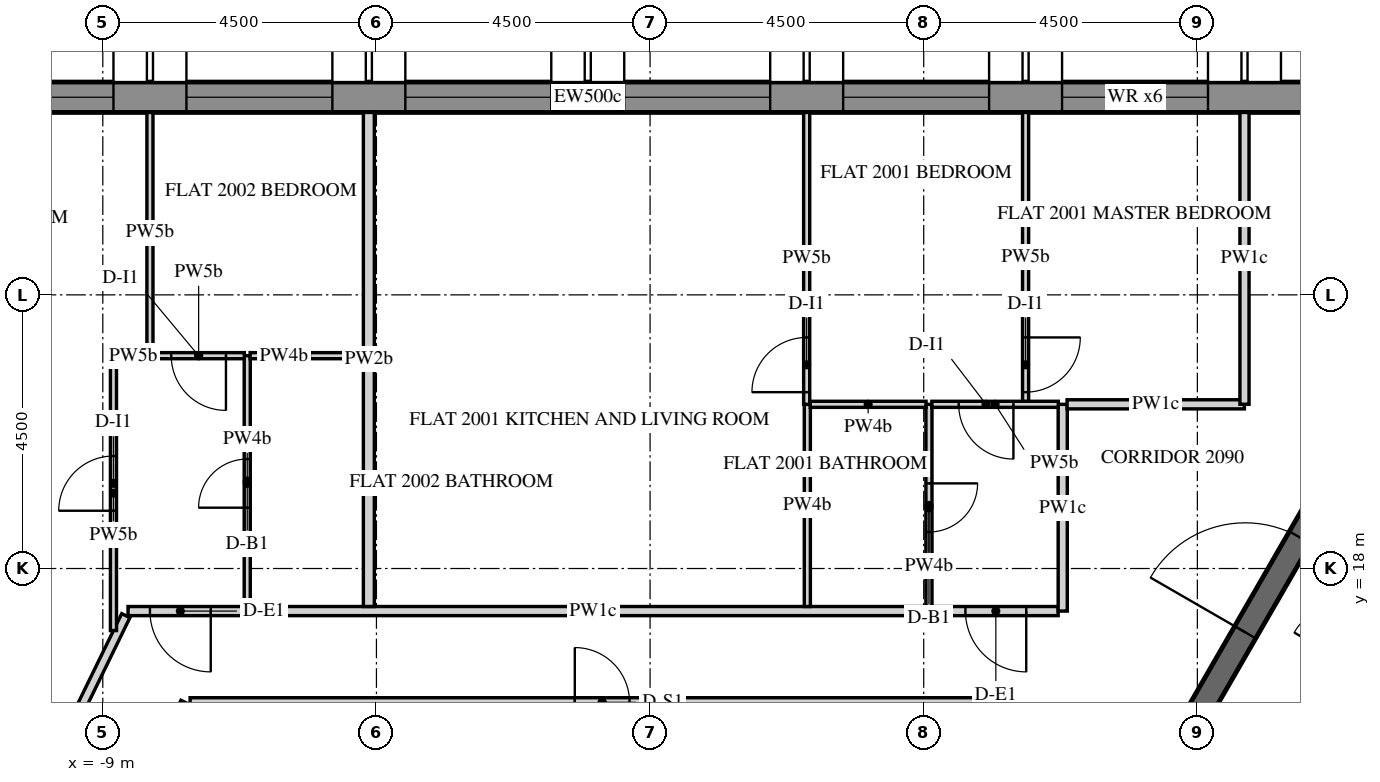
"""IFC4 building model, lengths in metres.
Left out: names, types, materials, properties, quantities, classifications, styles, units other than length and angle.
Written with IfcOpenShell. Run it as: python <this file> out.ifc"""

import sys

from ifc_helpers import new_model, si_unit, direction, frame, frame_2d, origin, place, context, subcontext, project, spatial, polyline, rectangle, outline, extrude, element, fill, save


model = new_model("IFC4")
c1 = context("Model", 3, precision=1e-05, world=origin(), true_north=direction((0.0, 1.0)))
c2 = subcontext(c1, "Body", "Model", "MODEL_VIEW")
j1 = project(units=[si_unit("LENGTHUNIT", "METRE"), si_unit("PLANEANGLEUNIT", "RADIAN")], contexts=[c1])
p1 = place(None, origin())
s1 = spatial("IfcSite", under=j1, at=p1, CompositionType="ELEMENT")
p2 = place(p1, origin())
s2 = spatial("IfcBuilding", under=s1, at=p2, CompositionType="ELEMENT")
p3 = place(p2, frame((0.0, 0.0, 256.2)))
s3 = spatial("IfcBuildingStorey", under=s2, at=p3, CompositionType="ELEMENT", Elevation=256.2)
p4 = place(p3, frame((11.698, 25.75, 0.0), z_axis=(0.0, 0.0, 1.0), x_axis=(-1.0, 0.0, 0.0)))
e1 = element("IfcWall", 1, at=p4, inside=s3, PredefinedType="SOLIDWALL", context=c2, shape_type="SweptSolid", body=[
    extrude(outline(polyline([(-0.021, -0.25), (25.468, -0.25), (25.421, 0.25), (0.021, 0.25), (-0.021, -0.25)])), origin(), (0.0, 0.0, 1.0), 3.75),
])
p5 = place(p4, frame((2.522, 0.0, 0.6)))
e2 = element("IfcOpeningElement", 2, at=p5, cuts=e1, PredefinedType="OPENING", context=c2, shape_type="SweptSolid", body=[
    extrude(rectangle(XDim=2.4, YDim=2.7, at=frame_2d((1.2, 1.35))), frame((0.0, 0.26, 0.0), z_axis=(0.0, -1.0, 0.0), x_axis=(1.0, 0.0, 0.0)), (0.0, 0.0, 1.0), 0.52),
])
p6 = place(p4, frame((6.122, 0.0, 0.6)))
e3 = element("IfcOpeningElement", 3, at=p6, cuts=e1, PredefinedType="OPENING", context=c2, shape_type="SweptSolid", body=[
    extrude(rectangle(XDim=2.4, YDim=2.7, at=frame_2d((1.2, 1.35))), frame((0.0, 0.26, 0.0), z_axis=(0.0, -1.0, 0.0), x_axis=(1.0, 0.0, 0.0)), (0.0, 0.0, 1.0), 0.52),
])
p7 = place(p4, frame((9.722, 0.0, 0.6)))
e4 = element("IfcOpeningElement", 4, at=p7, cuts=e1, PredefinedType="OPENING", context=c2, shape_type="SweptSolid", body=[
    extrude(rectangle(XDim=2.4, YDim=2.7, at=frame_2d((1.2, 1.35))), frame((0.0, 0.26, 0.0), z_axis=(0.0, -1.0, 0.0), x_axis=(1.0, 0.0, 0.0)), (0.0, 0.0, 1.0), 0.52),
])
p8 = place(p4, frame((13.323, 0.0, 0.6)))
e5 = element("IfcOpeningElement", 5, at=p8, cuts=e1, PredefinedType="OPENING", context=c2, shape_type="SweptSolid", body=[
    extrude(rectangle(XDim=2.4, YDim=2.7, at=frame_2d((1.2, 1.35))), frame((0.0, 0.26, 0.0), z_axis=(0.0, -1.0, 0.0), x_axis=(1.0, 0.0, 0.0)), (0.0, 0.0, 1.0), 0.52),
])
p9 = place(p4, frame((16.922, 0.0, 0.6)))
e6 = element("IfcOpeningElement", 6, at=p9, cuts=e1, PredefinedType="OPENING", context=c2, shape_type="SweptSolid", body=[
    extrude(rectangle(XDim=2.4, YDim=2.7, at=frame_2d((1.2, 1.35))), frame((0.0, 0.26, 0.0), z_axis=(0.0, -1.0, 0.0), x_axis=(1.0, 0.0, 0.0)), (0.0, 0.0, 1.0), 0.52),
])
p10 = place(p4, frame((20.522, 0.0, 0.6)))
e7 = element("IfcOpeningElement", 7, at=p10, cuts=e1, PredefinedType="OPENING", context=c2, shape_type="SweptSolid", body=[
    extrude(rectangle(XDim=2.4, YDim=2.7, at=frame_2d((1.2, 1.35))), frame((0.0, 0.26, 0.0), z_axis=(0.0, -1.0, 0.0), x_axis=(1.0, 0.0, 0.0)), (0.0, 0.0, 1.0), 0.52),
])
p11 = place(p3, frame((6.351, 11.0, 0.0), z_axis=(0.0, 0.0, 1.0), x_axis=(0.499998894578, 0.866026041999, 0.0)))
e8 = element("IfcWall", 8, at=p11, inside=s3, PredefinedType="SHEAR", context=c2, shape_type="SweptSolid", body=[
    extrude(rectangle(XDim=15.544, YDim=0.4, at=frame_2d((7.772, 0.0))), origin(), (0.0, 0.0, 1.0), 3.75),
])
p12 = place(p11, frame((6.872, 0.0, 0.0)))
e9 = element("IfcOpeningElement", 9, at=p12, cuts=e8, PredefinedType="OPENING", context=c2, shape_type="SweptSolid", body=[
    extrude(rectangle(XDim=1.8, YDim=2.4, at=frame_2d((0.9, 1.2))), frame((0.0, 0.21, 0.0), z_axis=(0.0, -1.0, 0.0), x_axis=(1.0, 0.0, 0.0)), (0.0, 0.0, 1.0), 0.42),
])
p13 = place(p3, frame((6.711, 17.3, 0.0), z_axis=(0.0, 0.0, 1.0), x_axis=(-1.0, 0.0, 0.0)))
e10 = element("IfcWall", 10, at=p13, inside=s3, PredefinedType="PARTITIONING", context=c2, shape_type="SweptSolid", body=[
    extrude(rectangle(XDim=15.296, YDim=0.15, at=frame_2d((7.648, 0.0))), origin(), (0.0, 0.0, 1.0), 2.823),
])
p14 = place(p13, frame((0.525, 0.0, 0.0)))
e11 = element("IfcOpeningElement", 11, at=p14, cuts=e10, PredefinedType="OPENING", context=c2, shape_type="SweptSolid", body=[
    extrude(rectangle(XDim=1.0, YDim=2.1, at=frame_2d((0.5, 1.05))), frame((0.0, 0.085, 0.0), z_axis=(0.0, -1.0, 0.0), x_axis=(1.0, 0.0, 0.0)), (0.0, 0.0, 1.0), 0.17),
])
p15 = place(p13, frame((13.936, 0.0, 0.0)))
e12 = element("IfcOpeningElement", 12, at=p15, cuts=e10, PredefinedType="OPENING", context=c2, shape_type="SweptSolid", body=[
    extrude(rectangle(XDim=1.0, YDim=2.1, at=frame_2d((0.5, 1.05))), frame((0.0, 0.085, 0.0), z_axis=(0.0, -1.0, 0.0), x_axis=(1.0, 0.0, 0.0)), (0.0, 0.0, 1.0), 0.17),
])
p16 = place(p3, frame((6.786, 20.7, 0.0), z_axis=(0.0, 0.0, 1.0), x_axis=(0.0, -1.0, 0.0)))
e13 = element("IfcWall", 13, at=p16, inside=s3, PredefinedType="PARTITIONING", context=c2, shape_type="SweptSolid", body=[
    extrude(rectangle(XDim=3.4, YDim=0.15, at=frame_2d((1.7, 0.0))), origin(), (0.0, 0.0, 1.0), 2.823),
])
p17 = place(p3, frame((9.774, 20.7, 0.0), z_axis=(0.0, 0.0, 1.0), x_axis=(-1.0, 0.0, 0.0)))
e14 = element("IfcWall", 14, at=p17, inside=s3, PredefinedType="PARTITIONING", context=c2, shape_type="SweptSolid", body=[
    extrude(rectangle(XDim=2.916, YDim=0.15, at=frame_2d((1.458, 0.0))), origin(), (0.0, 0.0, 1.0), 2.823),
])
p18 = place(p3, frame((9.775, 25.5, 0.0), z_axis=(0.0, 0.0, 1.0), x_axis=(0.0, -1.0, 0.0)))
e15 = element("IfcWall", 15, at=p18, inside=s3, PredefinedType="PARTITIONING", context=c2, shape_type="SweptSolid", body=[
    extrude(rectangle(XDim=4.799, YDim=0.15, at=frame_2d((2.399, 0.0))), origin(), (0.0, 0.0, 1.0), 2.823),
])
p19 = place(p3, frame((-8.622, 17.225, 0.0), z_axis=(0.0, 0.0, 1.0), x_axis=(-0.438366544921, -0.898796290765, 0.0)))
e16 = element("IfcWall", 16, at=p19, inside=s3, PredefinedType="PARTITIONING", context=c2, shape_type="SweptSolid", body=[
    extrude(rectangle(XDim=17.273, YDim=0.15, at=frame_2d((8.637, 0.0))), origin(), (0.0, 0.0, 1.0), 2.823),
])
p20 = place(p19, frame((6.478, 0.0, 0.0)))
e17 = element("IfcOpeningElement", 17, at=p20, cuts=e16, PredefinedType="OPENING", context=c2, shape_type="SweptSolid", body=[
    extrude(rectangle(XDim=1.0, YDim=2.1, at=frame_2d((0.5, 1.05))), frame((0.0, 0.085, 0.0), z_axis=(0.0, -1.0, 0.0), x_axis=(1.0, 0.0, 0.0)), (0.0, 0.0, 1.0), 0.17),
])
p21 = place(p3, frame((-11.499, 7.905, 0.0), z_axis=(0.0, 0.0, 1.0), x_axis=(0.438365041944, 0.898797023805, 0.0)))
e18 = element("IfcWall", 18, at=p21, inside=s3, PredefinedType="PARTITIONING", context=c2, shape_type="SweptSolid", body=[
    extrude(rectangle(XDim=8.784, YDim=0.15, at=frame_2d((4.392, 0.0))), origin(), (0.0, 0.0, 1.0), 2.823),
])
p22 = place(p3, frame((-7.564, 15.8, 0.0), z_axis=(0.0, 0.0, 1.0), x_axis=(1.0, 0.0, 0.0)))
e19 = element("IfcWall", 19, at=p22, inside=s3, PredefinedType="PARTITIONING", context=c2, shape_type="SweptSolid", body=[
    extrude(rectangle(XDim=13.553, YDim=0.15, at=frame_2d((6.776, 0.0))), origin(), (0.0, 0.0, 1.0), 2.823),
])
p23 = place(p22, frame((6.326, 0.0, 0.0)))
e20 = element("IfcOpeningElement", 20, at=p23, cuts=e19, PredefinedType="OPENING", context=c2, shape_type="SweptSolid", body=[
    extrude(rectangle(XDim=0.9, YDim=2.1, at=frame_2d((0.45, 1.05))), frame((0.0, 0.085, 0.0), z_axis=(0.0, -1.0, 0.0), x_axis=(1.0, 0.0, 0.0)), (0.0, 0.0, 1.0), 0.17),
])
p24 = place(p3, frame((9.611, 13.246, 0.0), z_axis=(0.0, 0.0, 1.0), x_axis=(0.499994435258, 0.866028616566, 0.0)))
e21 = element("IfcWall", 21, at=p24, inside=s3, PredefinedType="PARTITIONING", context=c2, shape_type="SweptSolid", body=[
    extrude(rectangle(XDim=7.097, YDim=0.15, at=frame_2d((3.548, 0.0))), origin(), (0.0, 0.0, 1.0), 2.823),
])
p25 = place(p24, frame((3.696, 0.0, 0.0)))
e22 = element("IfcOpeningElement", 22, at=p25, cuts=e21, PredefinedType="OPENING", context=c2, shape_type="SweptSolid", body=[
    extrude(rectangle(XDim=1.0, YDim=2.1, at=frame_2d((0.5, 1.05))), frame((0.0, 0.085, 0.0), z_axis=(0.0, -1.0, 0.0), x_axis=(1.0, 0.0, 0.0)), (0.0, 0.0, 1.0), 0.17),
])
p26 = place(p3, frame((2.586, 17.375, 0.0), z_axis=(0.0, 0.0, 1.0), x_axis=(0.0, 1.0, 0.0)))
e23 = element("IfcWall", 23, at=p26, inside=s3, PredefinedType="PARTITIONING", context=c2, shape_type="SweptSolid", body=[
    extrude(rectangle(XDim=3.325, YDim=0.1, at=frame_2d((1.663, 0.0))), origin(), (0.0, 0.0, 1.0), 2.823),
])
p27 = place(p3, frame((2.575, 20.7, 0.0), z_axis=(0.0, 0.0, 1.0), x_axis=(0.0, 1.0, 0.0)))
e24 = element("IfcWall", 24, at=p27, inside=s3, PredefinedType="PARTITIONING", context=c2, shape_type="SweptSolid", body=[
    extrude(rectangle(XDim=4.8, YDim=0.1, at=frame_2d((2.4, 0.0))), origin(), (0.0, 0.0, 1.0), 2.823),
])
p28 = place(p27, frame((0.2, 0.0, 0.0)))
e25 = element("IfcOpeningElement", 25, at=p28, cuts=e24, PredefinedType="OPENING", context=c2, shape_type="SweptSolid", body=[
    extrude(rectangle(XDim=0.9, YDim=2.1, at=frame_2d((0.45, 1.05))), frame((0.0, 0.06, 0.0), z_axis=(0.0, -1.0, 0.0), x_axis=(1.0, 0.0, 0.0)), (0.0, 0.0, 1.0), 0.12),
])
p29 = place(p3, frame((-4.625, 25.5, 0.0), z_axis=(0.0, 0.0, 1.0), x_axis=(0.0, -1.0, 0.0)))
e26 = element("IfcWall", 26, at=p29, inside=s3, PredefinedType="PARTITIONING", context=c2, shape_type="SweptSolid", body=[
    extrude(rectangle(XDim=8.125, YDim=0.18, at=frame_2d((4.062, 0.0))), origin(), (0.0, 0.0, 1.0), 2.823),
])
p30 = place(p3, frame((4.586, 20.7, 0.0), z_axis=(0.0, 0.0, 1.0), x_axis=(0.0, -1.0, 0.0)))
e27 = element("IfcWall", 27, at=p30, inside=s3, PredefinedType="PARTITIONING", context=c2, shape_type="SweptSolid", body=[
    extrude(rectangle(XDim=3.325, YDim=0.1, at=frame_2d((1.663, 0.0))), origin(), (0.0, 0.0, 1.0), 2.823),
])
p31 = place(p30, frame((1.3, 0.0, 0.0)))
e28 = element("IfcOpeningElement", 28, at=p31, cuts=e27, PredefinedType="OPENING", context=c2, shape_type="SweptSolid", body=[
    extrude(rectangle(XDim=0.8, YDim=2.1, at=frame_2d((0.4, 1.05))), frame((0.0, 0.06, 0.0), z_axis=(0.0, -1.0, 0.0), x_axis=(1.0, 0.0, 0.0)), (0.0, 0.0, 1.0), 0.12),
])
p32 = place(p3, frame((6.713, 20.7, 0.0), z_axis=(0.0, 0.0, 1.0), x_axis=(-1.0, 0.0, 0.0)))
e29 = element("IfcWall", 29, at=p32, inside=s3, PredefinedType="PARTITIONING", context=c2, shape_type="SweptSolid", body=[
    extrude(rectangle(XDim=2.079, YDim=0.1, at=frame_2d((1.04, 0.0))), origin(), (0.0, 0.0, 1.0), 2.823),
])
p33 = place(p32, frame((0.738, 0.0, 0.0)))
e30 = element("IfcOpeningElement", 30, at=p33, cuts=e29, PredefinedType="OPENING", context=c2, shape_type="SweptSolid", body=[
    extrude(rectangle(XDim=0.9, YDim=2.1, at=frame_2d((0.45, 1.05))), frame((0.0, 0.06, 0.0), z_axis=(0.0, -1.0, 0.0), x_axis=(1.0, 0.0, 0.0)), (0.0, 0.0, 1.0), 0.12),
])
p34 = place(p3, frame((4.538, 20.7, 0.0), z_axis=(0.0, 0.0, 1.0), x_axis=(-1.0, 0.0, 0.0)))
e31 = element("IfcWall", 31, at=p34, inside=s3, PredefinedType="PARTITIONING", context=c2, shape_type="SweptSolid", body=[
    extrude(rectangle(XDim=1.904, YDim=0.1, at=frame_2d((0.952, 0.0))), origin(), (0.0, 0.0, 1.0), 2.823),
])
p35 = place(p3, frame((6.175, 25.5, 0.0), z_axis=(0.0, 0.0, 1.0), x_axis=(0.0, -1.0, 0.0)))
e32 = element("IfcWall", 32, at=p35, inside=s3, PredefinedType="PARTITIONING", context=c2, shape_type="SweptSolid", body=[
    extrude(rectangle(XDim=4.75, YDim=0.1, at=frame_2d((2.375, 0.0))), origin(), (0.0, 0.0, 1.0), 2.823),
])
p36 = place(p35, frame((3.7, 0.0, 0.0)))
e33 = element("IfcOpeningElement", 33, at=p36, cuts=e32, PredefinedType="OPENING", context=c2, shape_type="SweptSolid", body=[
    extrude(rectangle(XDim=0.9, YDim=2.1, at=frame_2d((0.45, 1.05))), frame((0.0, 0.06, 0.0), z_axis=(0.0, -1.0, 0.0), x_axis=(1.0, 0.0, 0.0)), (0.0, 0.0, 1.0), 0.12),
])
p37 = place(p3, frame((-8.825, 16.979, 0.0), z_axis=(0.0, 0.0, 1.0), x_axis=(0.0, 1.0, 0.0)))
e34 = element("IfcWall", 34, at=p37, inside=s3, PredefinedType="PARTITIONING", context=c2, shape_type="SweptSolid", body=[
    extrude(rectangle(XDim=4.521, YDim=0.1, at=frame_2d((2.26, 0.0))), origin(), (0.0, 0.0, 1.0), 2.823),
])
p38 = place(p37, frame((1.97, 0.0, 0.0)))
e35 = element("IfcOpeningElement", 35, at=p38, cuts=e34, PredefinedType="OPENING", context=c2, shape_type="SweptSolid", body=[
    extrude(rectangle(XDim=0.9, YDim=2.1, at=frame_2d((0.45, 1.05))), frame((0.0, 0.06, 0.0), z_axis=(0.0, -1.0, 0.0), x_axis=(1.0, 0.0, 0.0)), (0.0, 0.0, 1.0), 0.12),
])
p39 = place(p3, frame((-8.775, 21.5, 0.0), z_axis=(0.0, 0.0, 1.0), x_axis=(1.0, 0.0, 0.0)))
e36 = element("IfcWall", 36, at=p39, inside=s3, PredefinedType="PARTITIONING", context=c2, shape_type="SweptSolid", body=[
    extrude(rectangle(XDim=0.552, YDim=0.1, at=frame_2d((0.276, 0.0))), origin(), (0.0, 0.0, 1.0), 2.823),
])
p40 = place(p3, frame((-8.225, 21.55, 0.0), z_axis=(0.0, 0.0, 1.0), x_axis=(0.0, 1.0, 0.0)))
e37 = element("IfcWall", 37, at=p40, inside=s3, PredefinedType="PARTITIONING", context=c2, shape_type="SweptSolid", body=[
    extrude(rectangle(XDim=3.95, YDim=0.1, at=frame_2d((1.975, 0.0))), origin(), (0.0, 0.0, 1.0), 2.823),
])
p41 = place(p3, frame((-6.625, 17.375, 0.0), z_axis=(0.0, 0.0, 1.0), x_axis=(0.0, 1.0, 0.0)))
e38 = element("IfcWall", 38, at=p41, inside=s3, PredefinedType="PARTITIONING", context=c2, shape_type="SweptSolid", body=[
    extrude(rectangle(XDim=4.125, YDim=0.1, at=frame_2d((2.062, 0.0))), origin(), (0.0, 0.0, 1.0), 2.823),
])
p42 = place(p41, frame((1.625, 0.0, 0.0)))
e39 = element("IfcOpeningElement", 39, at=p42, cuts=e38, PredefinedType="OPENING", context=c2, shape_type="SweptSolid", body=[
    extrude(rectangle(XDim=0.8, YDim=2.1, at=frame_2d((0.4, 1.05))), frame((0.0, 0.06, 0.0), z_axis=(0.0, -1.0, 0.0), x_axis=(1.0, 0.0, 0.0)), (0.0, 0.0, 1.0), 0.12),
])
p43 = place(p3, frame((-6.673, 21.5, 0.0), z_axis=(0.0, 0.0, 1.0), x_axis=(-1.0, 0.0, 0.0)))
e40 = element("IfcWall", 40, at=p43, inside=s3, PredefinedType="PARTITIONING", context=c2, shape_type="SweptSolid", body=[
    extrude(rectangle(XDim=1.502, YDim=0.1, at=frame_2d((0.751, 0.0))), origin(), (0.0, 0.0, 1.0), 2.823),
])
p44 = place(p43, frame((0.302, 0.0, 0.0)))
e41 = element("IfcOpeningElement", 41, at=p44, cuts=e40, PredefinedType="OPENING", context=c2, shape_type="SweptSolid", body=[
    extrude(rectangle(XDim=0.9, YDim=2.1, at=frame_2d((0.45, 1.05))), frame((0.0, 0.06, 0.0), z_axis=(0.0, -1.0, 0.0), x_axis=(1.0, 0.0, 0.0)), (0.0, 0.0, 1.0), 0.12),
])
p45 = place(p3, frame((-4.715, 21.5, 0.0), z_axis=(0.0, 0.0, 1.0), x_axis=(-1.0, 0.0, 0.0)))
e42 = element("IfcWall", 42, at=p45, inside=s3, PredefinedType="PARTITIONING", context=c2, shape_type="SweptSolid", body=[
    extrude(rectangle(XDim=1.862, YDim=0.1, at=frame_2d((0.931, 0.0))), origin(), (0.0, 0.0, 1.0), 2.823),
])
p46 = place(p3, frame((16.029, 18.26, 0.0), z_axis=(0.0, 0.0, 1.0), x_axis=(-0.82904538001, -0.559181328268, 0.0)))
e43 = element("IfcWall", 43, at=p46, inside=s3, PredefinedType="PARTITIONING", context=c2, shape_type="SweptSolid", body=[
    extrude(rectangle(XDim=6.79, YDim=0.18, at=frame_2d((3.395, 0.0))), origin(), (0.0, 0.0, 1.0), 2.823),
])
p47 = place(p5, frame((0.0, 0.18, 0.0)))
e44 = element("IfcWindow", 44, at=p47, inside=s3, PartitioningType="DOUBLE_PANEL_VERTICAL", PredefinedType="WINDOW", context=c2, shape_type="SweptSolid", body=[
    extrude(rectangle(XDim=2.4, YDim=2.7, at=frame_2d((1.2, 1.35))), frame((0.0, 0.03, 0.0), z_axis=(0.0, -1.0, 0.0), x_axis=(1.0, 0.0, 0.0)), (0.0, 0.0, 1.0), 0.06),
])
fill(e2, e44)
p48 = place(p6, frame((0.0, 0.18, 0.0)))
e45 = element("IfcWindow", 45, at=p48, inside=s3, PartitioningType="DOUBLE_PANEL_VERTICAL", PredefinedType="WINDOW", context=c2, shape_type="SweptSolid", body=[
    extrude(rectangle(XDim=2.4, YDim=2.7, at=frame_2d((1.2, 1.35))), frame((0.0, 0.03, 0.0), z_axis=(0.0, -1.0, 0.0), x_axis=(1.0, 0.0, 0.0)), (0.0, 0.0, 1.0), 0.06),
])
fill(e3, e45)
p49 = place(p7, frame((0.0, 0.18, 0.0)))
e46 = element("IfcWindow", 46, at=p49, inside=s3, PartitioningType="DOUBLE_PANEL_VERTICAL", PredefinedType="WINDOW", context=c2, shape_type="SweptSolid", body=[
    extrude(rectangle(XDim=2.4, YDim=2.7, at=frame_2d((1.2, 1.35))), frame((0.0, 0.03, 0.0), z_axis=(0.0, -1.0, 0.0), x_axis=(1.0, 0.0, 0.0)), (0.0, 0.0, 1.0), 0.06),
])
fill(e4, e46)
p50 = place(p8, frame((0.0, 0.18, 0.0)))
e47 = element("IfcWindow", 47, at=p50, inside=s3, PartitioningType="DOUBLE_PANEL_VERTICAL", PredefinedType="WINDOW", context=c2, shape_type="SweptSolid", body=[
    extrude(rectangle(XDim=2.4, YDim=2.7, at=frame_2d((1.2, 1.35))), frame((0.0, 0.03, 0.0), z_axis=(0.0, -1.0, 0.0), x_axis=(1.0, 0.0, 0.0)), (0.0, 0.0, 1.0), 0.06),
])
fill(e5, e47)
p51 = place(p9, frame((0.0, 0.18, 0.0)))
e48 = element("IfcWindow", 48, at=p51, inside=s3, PartitioningType="DOUBLE_PANEL_VERTICAL", PredefinedType="WINDOW", context=c2, shape_type="SweptSolid", body=[
    extrude(rectangle(XDim=2.4, YDim=2.7, at=frame_2d((1.2, 1.35))), frame((0.0, 0.03, 0.0), z_axis=(0.0, -1.0, 0.0), x_axis=(1.0, 0.0, 0.0)), (0.0, 0.0, 1.0), 0.06),
])
fill(e6, e48)
p52 = place(p10, frame((0.0, 0.18, 0.0)))
e49 = element("IfcWindow", 49, at=p52, inside=s3, PartitioningType="DOUBLE_PANEL_VERTICAL", PredefinedType="WINDOW", context=c2, shape_type="SweptSolid", body=[
    extrude(rectangle(XDim=2.4, YDim=2.7, at=frame_2d((1.2, 1.35))), frame((0.0, 0.03, 0.0), z_axis=(0.0, -1.0, 0.0), x_axis=(1.0, 0.0, 0.0)), (0.0, 0.0, 1.0), 0.06),
])
fill(e7, e49)
p53 = place(p12, origin())
e50 = element("IfcDoor", 50, at=p53, inside=s3, OperationType="DOUBLE_DOOR_SINGLE_SWING", PredefinedType="DOOR", context=c2, shape_type="SweptSolid", body=[
    extrude(rectangle(XDim=1.8, YDim=2.4, at=frame_2d((0.9, 1.2))), frame((0.0, 0.025, 0.0), z_axis=(0.0, -1.0, 0.0), x_axis=(1.0, 0.0, 0.0)), (0.0, 0.0, 1.0), 0.05),
])
fill(e9, e50)
p54 = place(p14, origin())
e51 = element("IfcDoor", 51, at=p54, inside=s3, OperationType="SINGLE_SWING_RIGHT", PredefinedType="DOOR", context=c2, shape_type="SweptSolid", body=[
    extrude(rectangle(XDim=1.0, YDim=2.1, at=frame_2d((0.5, 1.05))), frame((0.0, 0.025, 0.0), z_axis=(0.0, -1.0, 0.0), x_axis=(1.0, 0.0, 0.0)), (0.0, 0.0, 1.0), 0.05),
])
fill(e11, e51)
p55 = place(p31, origin())
e52 = element("IfcDoor", 52, at=p55, inside=s3, OperationType="SINGLE_SWING_LEFT", PredefinedType="DOOR", context=c2, shape_type="SweptSolid", body=[
    extrude(rectangle(XDim=0.8, YDim=2.1, at=frame_2d((0.4, 1.05))), frame((0.0, 0.025, 0.0), z_axis=(0.0, -1.0, 0.0), x_axis=(1.0, 0.0, 0.0)), (0.0, 0.0, 1.0), 0.05),
])
fill(e28, e52)
p56 = place(p33, origin())
e53 = element("IfcDoor", 53, at=p56, inside=s3, OperationType="SINGLE_SWING_RIGHT", PredefinedType="DOOR", context=c2, shape_type="SweptSolid", body=[
    extrude(rectangle(XDim=0.9, YDim=2.1, at=frame_2d((0.45, 1.05))), frame((0.0, 0.025, 0.0), z_axis=(0.0, -1.0, 0.0), x_axis=(1.0, 0.0, 0.0)), (0.0, 0.0, 1.0), 0.05),
])
fill(e30, e53)
p57 = place(p36, origin())
e54 = element("IfcDoor", 54, at=p57, inside=s3, OperationType="SINGLE_SWING_RIGHT", PredefinedType="DOOR", context=c2, shape_type="SweptSolid", body=[
    extrude(rectangle(XDim=0.9, YDim=2.1, at=frame_2d((0.45, 1.05))), frame((0.0, 0.025, 0.0), z_axis=(0.0, -1.0, 0.0), x_axis=(1.0, 0.0, 0.0)), (0.0, 0.0, 1.0), 0.05),
])
fill(e33, e54)
p58 = place(p28, origin())
e55 = element("IfcDoor", 55, at=p58, inside=s3, OperationType="SINGLE_SWING_RIGHT", PredefinedType="DOOR", context=c2, shape_type="SweptSolid", body=[
    extrude(rectangle(XDim=0.9, YDim=2.1, at=frame_2d((0.45, 1.05))), frame((0.0, 0.025, 0.0), z_axis=(0.0, -1.0, 0.0), x_axis=(1.0, 0.0, 0.0)), (0.0, 0.0, 1.0), 0.05),
])
fill(e25, e55)
p59 = place(p15, origin())
e56 = element("IfcDoor", 56, at=p59, inside=s3, OperationType="SINGLE_SWING_LEFT", PredefinedType="DOOR", context=c2, shape_type="SweptSolid", body=[
    extrude(rectangle(XDim=1.0, YDim=2.1, at=frame_2d((0.5, 1.05))), frame((0.0, 0.025, 0.0), z_axis=(0.0, -1.0, 0.0), x_axis=(1.0, 0.0, 0.0)), (0.0, 0.0, 1.0), 0.05),
])
fill(e12, e56)
p60 = place(p42, origin())
e57 = element("IfcDoor", 57, at=p60, inside=s3, OperationType="SINGLE_SWING_RIGHT", PredefinedType="DOOR", context=c2, shape_type="SweptSolid", body=[
    extrude(rectangle(XDim=0.8, YDim=2.1, at=frame_2d((0.4, 1.05))), frame((0.0, 0.025, 0.0), z_axis=(0.0, -1.0, 0.0), x_axis=(1.0, 0.0, 0.0)), (0.0, 0.0, 1.0), 0.05),
])
fill(e39, e57)
p61 = place(p38, origin())
e58 = element("IfcDoor", 58, at=p61, inside=s3, OperationType="SINGLE_SWING_LEFT", PredefinedType="DOOR", context=c2, shape_type="SweptSolid", body=[
    extrude(rectangle(XDim=0.9, YDim=2.1, at=frame_2d((0.45, 1.05))), frame((0.0, 0.025, 0.0), z_axis=(0.0, -1.0, 0.0), x_axis=(1.0, 0.0, 0.0)), (0.0, 0.0, 1.0), 0.05),
])
fill(e35, e58)
p62 = place(p44, origin())
e59 = element("IfcDoor", 59, at=p62, inside=s3, OperationType="SINGLE_SWING_RIGHT", PredefinedType="DOOR", context=c2, shape_type="SweptSolid", body=[
    extrude(rectangle(XDim=0.9, YDim=2.1, at=frame_2d((0.45, 1.05))), frame((0.0, 0.025, 0.0), z_axis=(0.0, -1.0, 0.0), x_axis=(1.0, 0.0, 0.0)), (0.0, 0.0, 1.0), 0.05),
])
fill(e41, e59)
p63 = place(p23, origin())
e60 = element("IfcDoor", 60, at=p63, inside=s3, OperationType="SINGLE_SWING_LEFT", PredefinedType="DOOR", context=c2, shape_type="SweptSolid", body=[
    extrude(rectangle(XDim=0.9, YDim=2.1, at=frame_2d((0.45, 1.05))), frame((0.0, 0.025, 0.0), z_axis=(0.0, -1.0, 0.0), x_axis=(1.0, 0.0, 0.0)), (0.0, 0.0, 1.0), 0.05),
])
fill(e20, e60)
save(model, sys.argv[1])
